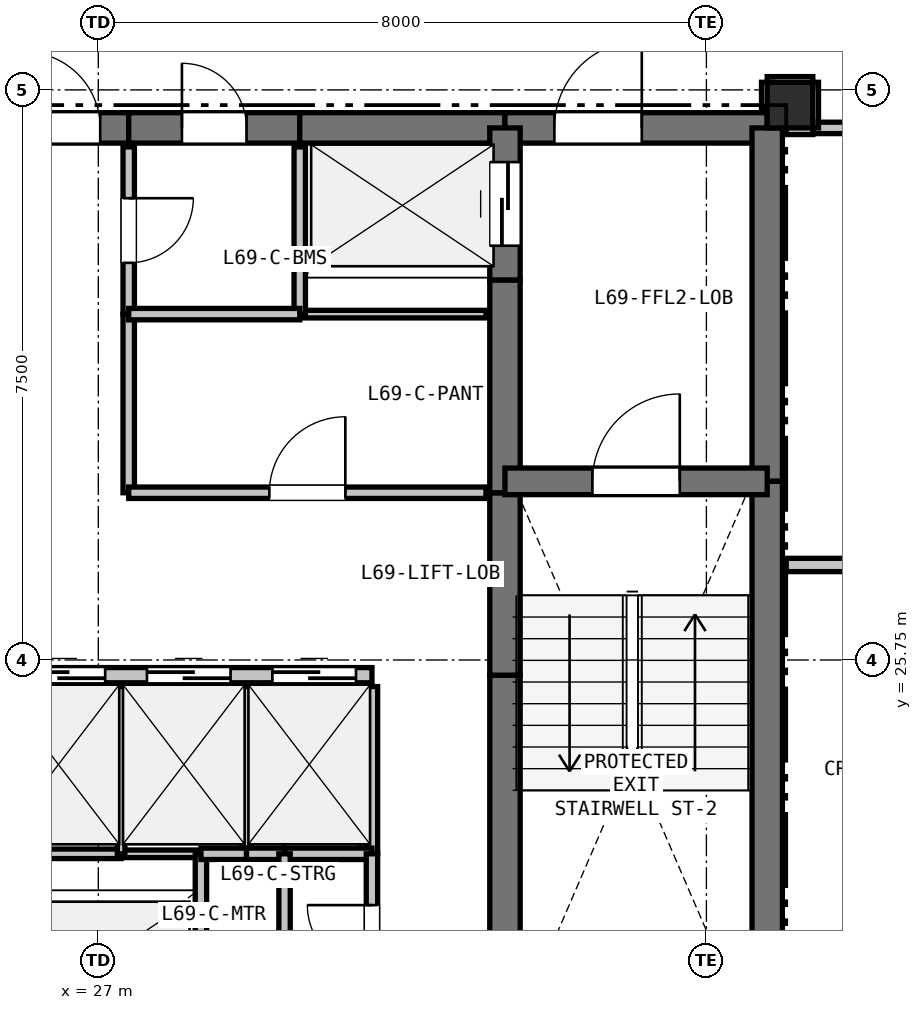
"""IFC4 building model, lengths in metres.
Left out: names, types, materials, properties, quantities, classifications, styles, units other than length and angle.
Written with IfcOpenShell. Run it as: python <this file> out.ifc"""

import sys

from ifc_helpers import new_model, si_unit, direction, frame, frame_2d, origin, origin_2d, place, context, subcontext, project, spatial, rectangle, extrude, element, fill, save


model = new_model("IFC4")
c1 = context("Model", 3, precision=1e-05, world=origin(), true_north=direction((0.0, 1.0)))
c2 = subcontext(c1, "Body", "Model", "MODEL_VIEW")
j1 = project(units=[si_unit("LENGTHUNIT", "METRE"), si_unit("PLANEANGLEUNIT", "RADIAN")], contexts=[c1])
p1 = place(None, origin())
s1 = spatial("IfcSite", under=j1, at=p1, CompositionType="ELEMENT")
p2 = place(p1, origin())
s2 = spatial("IfcBuilding", under=s1, at=p2, CompositionType="ELEMENT")
p3 = place(p2, frame((0.0, 0.0, 246.3)))
s3 = spatial("IfcBuildingStorey", under=s2, at=p3, CompositionType="ELEMENT", Elevation=246.3)
p4 = place(p3, frame((36.1, 33.05, 0.0), z_axis=(0.0, 0.0, 1.0), x_axis=(1.0, 0.0, 0.0)))
e1 = element("IfcColumn", 1, at=p4, inside=s3, PredefinedType="COLUMN", context=c2, shape_type="SweptSolid", body=[
    extrude(rectangle(XDim=0.6, YDim=0.6, at=origin_2d()), origin(), (0.0, 0.0, 1.0), 3.3),
])
p5 = place(p3, frame((25.65, 32.75, 0.0), z_axis=(0.0, 0.0, 1.0), x_axis=(1.0, 0.0, 0.0)))
e2 = element("IfcWall", 2, at=p5, inside=s3, PredefinedType="SHEAR", context=c2, shape_type="SweptSolid", body=[
    extrude(rectangle(XDim=1.75, YDim=0.4, at=frame_2d((0.875, 0.0))), origin(), (0.0, 0.0, 1.0), 3.02),
])
p6 = place(p5, frame((0.375, 0.0, 0.0)))
e3 = element("IfcOpeningElement", 3, at=p6, cuts=e2, PredefinedType="OPENING", context=c2, shape_type="SweptSolid", body=[
    extrude(rectangle(XDim=1.0, YDim=2.15, at=frame_2d((0.5, 1.075))), frame((0.0, 0.21, 0.0), z_axis=(0.0, -1.0, 0.0), x_axis=(1.0, 0.0, 0.0)), (0.0, 0.0, 1.0), 0.42),
])
p7 = place(p3, frame((27.4, 32.75, 0.0), z_axis=(0.0, 0.0, 1.0), x_axis=(1.0, 0.0, 0.0)))
e4 = element("IfcWall", 4, at=p7, inside=s3, PredefinedType="SHEAR", context=c2, shape_type="SweptSolid", body=[
    extrude(rectangle(XDim=2.25, YDim=0.4, at=frame_2d((1.125, 0.0))), origin(), (0.0, 0.0, 1.0), 3.02),
])
p8 = place(p7, frame((0.7, 0.0, 0.0)))
e5 = element("IfcOpeningElement", 5, at=p8, cuts=e4, PredefinedType="OPENING", context=c2, shape_type="SweptSolid", body=[
    extrude(rectangle(XDim=0.85, YDim=2.1, at=frame_2d((0.425, 1.05))), frame((0.0, 0.21, 0.0), z_axis=(0.0, -1.0, 0.0), x_axis=(1.0, 0.0, 0.0)), (0.0, 0.0, 1.0), 0.42),
])
p9 = place(p3, frame((29.65, 32.75, 0.0), z_axis=(0.0, 0.0, 1.0), x_axis=(1.0, 0.0, 0.0)))
e6 = element("IfcWall", 6, at=p9, inside=s3, PredefinedType="SHEAR", context=c2, shape_type="SweptSolid", body=[
    extrude(rectangle(XDim=2.7, YDim=0.4, at=frame_2d((1.35, 0.0))), origin(), (0.0, 0.0, 1.0), 3.02),
])
p10 = place(p3, frame((32.35, 32.75, 0.0), z_axis=(0.0, 0.0, 1.0), x_axis=(1.0, 0.0, 0.0)))
e7 = element("IfcWall", 7, at=p10, inside=s3, PredefinedType="SHEAR", context=c2, shape_type="SweptSolid", body=[
    extrude(rectangle(XDim=3.45, YDim=0.4, at=frame_2d((1.725, 0.0))), origin(), (0.0, 0.0, 1.0), 3.02),
])
p11 = place(p10, frame((0.65, 0.0, 0.0)))
e8 = element("IfcOpeningElement", 8, at=p11, cuts=e7, PredefinedType="OPENING", context=c2, shape_type="SweptSolid", body=[
    extrude(rectangle(XDim=1.15, YDim=2.15, at=frame_2d((0.575, 1.075))), frame((0.0, 0.21, 0.0), z_axis=(0.0, -1.0, 0.0), x_axis=(1.0, 0.0, 0.0)), (0.0, 0.0, 1.0), 0.42),
])
p12 = place(p3, frame((35.8, 32.75, 0.0), z_axis=(0.0, 0.0, 1.0), x_axis=(0.0, -1.0, 0.0)))
e9 = element("IfcWall", 9, at=p12, inside=s3, PredefinedType="SHEAR", context=c2, shape_type="SweptSolid", body=[
    extrude(rectangle(XDim=4.65, YDim=0.4, at=frame_2d((2.325, 0.0))), origin(), (0.0, 0.0, 1.0), 3.02),
])
p13 = place(p3, frame((35.8, 28.1, 0.0), z_axis=(0.0, 0.0, 1.0), x_axis=(0.0, -1.0, 0.0)))
e10 = element("IfcWall", 10, at=p13, inside=s3, PredefinedType="SHEAR", context=c2, shape_type="SweptSolid", body=[
    extrude(rectangle(XDim=7.35, YDim=0.4, at=frame_2d((3.675, 0.0))), origin(), (0.0, 0.0, 1.0), 3.02),
])
p14 = place(p3, frame((32.35, 20.75, 0.0), z_axis=(0.0, 0.0, 1.0), x_axis=(0.0, 1.0, 0.0)))
e11 = element("IfcWall", 11, at=p14, inside=s3, PredefinedType="SHEAR", context=c2, shape_type="SweptSolid", body=[
    extrude(rectangle(XDim=4.8, YDim=0.4, at=frame_2d((2.4, 0.0))), origin(), (0.0, 0.0, 1.0), 3.02),
])
p15 = place(p3, frame((32.35, 25.55, 0.0), z_axis=(0.0, 0.0, 1.0), x_axis=(0.0, 1.0, 0.0)))
e12 = element("IfcWall", 12, at=p15, inside=s3, PredefinedType="SHEAR", context=c2, shape_type="SweptSolid", body=[
    extrude(rectangle(XDim=2.4, YDim=0.4, at=frame_2d((1.2, 0.0))), origin(), (0.0, 0.0, 1.0), 3.02),
])
p16 = place(p3, frame((32.35, 27.95, 0.0), z_axis=(0.0, 0.0, 1.0), x_axis=(0.0, 1.0, 0.0)))
e13 = element("IfcWall", 13, at=p16, inside=s3, PredefinedType="SHEAR", context=c2, shape_type="SweptSolid", body=[
    extrude(rectangle(XDim=2.8, YDim=0.4, at=frame_2d((1.4, 0.0))), origin(), (0.0, 0.0, 1.0), 3.02),
])
p17 = place(p3, frame((32.35, 30.75, 0.0), z_axis=(0.0, 0.0, 1.0), x_axis=(0.0, 1.0, 0.0)))
e14 = element("IfcWall", 14, at=p17, inside=s3, PredefinedType="SHEAR", context=c2, shape_type="SweptSolid", body=[
    extrude(rectangle(XDim=2.0, YDim=0.4, at=frame_2d((1.0, 0.0))), origin(), (0.0, 0.0, 1.0), 3.02),
])
p18 = place(p17, frame((0.45, 0.0, 0.0)))
e15 = element("IfcOpeningElement", 15, at=p18, cuts=e14, PredefinedType="OPENING", context=c2, shape_type="SweptSolid", body=[
    extrude(rectangle(XDim=1.1, YDim=2.15, at=frame_2d((0.55, 1.075))), frame((0.0, 0.21, 0.0), z_axis=(0.0, -1.0, 0.0), x_axis=(1.0, 0.0, 0.0)), (0.0, 0.0, 1.0), 0.42),
])
p19 = place(p3, frame((32.35, 28.1, 0.0), z_axis=(0.0, 0.0, 1.0), x_axis=(1.0, 0.0, 0.0)))
e16 = element("IfcWall", 16, at=p19, inside=s3, PredefinedType="SHEAR", context=c2, shape_type="SweptSolid", body=[
    extrude(rectangle(XDim=3.45, YDim=0.35, at=frame_2d((1.725, 0.0))), origin(), (0.0, 0.0, 1.0), 3.02),
])
p20 = place(p19, frame((1.15, 0.0, 0.0)))
e17 = element("IfcOpeningElement", 17, at=p20, cuts=e16, PredefinedType="OPENING", context=c2, shape_type="SweptSolid", body=[
    extrude(rectangle(XDim=1.15, YDim=2.15, at=frame_2d((0.575, 1.075))), frame((0.0, 0.185, 0.0), z_axis=(0.0, -1.0, 0.0), x_axis=(1.0, 0.0, 0.0)), (0.0, 0.0, 1.0), 0.37),
])
p21 = place(p3, frame((25.65, 25.55, 0.0), z_axis=(0.0, 0.0, 1.0), x_axis=(1.0, 0.0, 0.0)))
e18 = element("IfcWall", 18, at=p21, inside=s3, PredefinedType="PARTITIONING", context=c2, shape_type="SweptSolid", body=[
    extrude(rectangle(XDim=4.95, YDim=0.2, at=frame_2d((2.475, 0.0))), origin(), (0.0, 0.0, 1.0), 3.02),
])
p22 = place(p21, frame((0.34, 0.0, 0.0)))
e19 = element("IfcOpeningElement", 19, at=p22, cuts=e18, PredefinedType="OPENING", context=c2, shape_type="SweptSolid", body=[
    extrude(rectangle(XDim=1.1, YDim=2.15, at=frame_2d((0.55, 1.075))), frame((0.0, 0.11, 0.0), z_axis=(0.0, -1.0, 0.0), x_axis=(1.0, 0.0, 0.0)), (0.0, 0.0, 1.0), 0.22),
])
p23 = place(p21, frame((1.99, 0.0, 0.0)))
e20 = element("IfcOpeningElement", 20, at=p23, cuts=e18, PredefinedType="OPENING", context=c2, shape_type="SweptSolid", body=[
    extrude(rectangle(XDim=1.1, YDim=2.15, at=frame_2d((0.55, 1.075))), frame((0.0, 0.11, 0.0), z_axis=(0.0, -1.0, 0.0), x_axis=(1.0, 0.0, 0.0)), (0.0, 0.0, 1.0), 0.22),
])
p24 = place(p21, frame((3.64, 0.0, 0.0)))
e21 = element("IfcOpeningElement", 21, at=p24, cuts=e18, PredefinedType="OPENING", context=c2, shape_type="SweptSolid", body=[
    extrude(rectangle(XDim=1.1, YDim=2.15, at=frame_2d((0.55, 1.075))), frame((0.0, 0.11, 0.0), z_axis=(0.0, -1.0, 0.0), x_axis=(1.0, 0.0, 0.0)), (0.0, 0.0, 1.0), 0.22),
])
p25 = place(p3, frame((25.9, 23.2, 0.0), z_axis=(0.0, 0.0, 1.0), x_axis=(1.0, 0.0, 0.0)))
e22 = element("IfcWall", 22, at=p25, inside=s3, PredefinedType="PARTITIONING", context=c2, shape_type="SweptSolid", body=[
    extrude(rectangle(XDim=1.4, YDim=0.125, at=frame_2d((0.7, 0.0))), origin(), (0.0, 0.0, 1.0), 3.02),
])
p26 = place(p3, frame((27.3, 23.2, 0.0), z_axis=(0.0, 0.0, 1.0), x_axis=(1.0, 0.0, 0.0)))
e23 = element("IfcWall", 23, at=p26, inside=s3, PredefinedType="PARTITIONING", context=c2, shape_type="SweptSolid", body=[
    extrude(rectangle(XDim=1.05, YDim=0.1, at=frame_2d((0.525, 0.0))), origin(), (0.0, 0.0, 1.0), 3.02),
])
p27 = place(p3, frame((28.35, 23.2, 0.0), z_axis=(0.0, 0.0, 1.0), x_axis=(0.0, -1.0, 0.0)))
e24 = element("IfcWall", 24, at=p27, inside=s3, PredefinedType="PARTITIONING", context=c2, shape_type="SweptSolid", body=[
    extrude(rectangle(XDim=2.2, YDim=0.15, at=frame_2d((1.1, 0.0))), origin(), (0.0, 0.0, 1.0), 3.02),
])
p28 = place(p3, frame((32.1, 30.3, 0.0), z_axis=(0.0, 0.0, 1.0), x_axis=(-1.0, 0.0, 0.0)))
e25 = element("IfcWall", 25, at=p28, inside=s3, PredefinedType="PARTITIONING", context=c2, shape_type="SweptSolid", body=[
    extrude(rectangle(XDim=2.45, YDim=0.1, at=frame_2d((1.225, 0.0))), origin(), (0.0, 0.0, 1.0), 3.02),
])
p29 = place(p3, frame((29.65, 30.3, 0.0), z_axis=(0.0, 0.0, 1.0), x_axis=(0.0, 1.0, 0.0)))
e26 = element("IfcWall", 26, at=p29, inside=s3, PredefinedType="PARTITIONING", context=c2, shape_type="SweptSolid", body=[
    extrude(rectangle(XDim=2.2, YDim=0.15, at=frame_2d((1.1, 0.0))), origin(), (0.0, 0.0, 1.0), 3.02),
])
p30 = place(p3, frame((27.3, 25.4, 0.0), z_axis=(0.0, 0.0, 1.0), x_axis=(0.0, -1.0, 0.0)))
e27 = element("IfcWall", 27, at=p30, inside=s3, PredefinedType="PARTITIONING", context=c2, shape_type="SweptSolid", body=[
    extrude(rectangle(XDim=2.2, YDim=0.1, at=frame_2d((1.1, 0.0))), origin(), (0.0, 0.0, 1.0), 3.02),
])
p31 = place(p3, frame((28.95, 25.4, 0.0), z_axis=(0.0, 0.0, 1.0), x_axis=(0.0, -1.0, 0.0)))
e28 = element("IfcWall", 28, at=p31, inside=s3, PredefinedType="PARTITIONING", context=c2, shape_type="SweptSolid", body=[
    extrude(rectangle(XDim=2.2, YDim=0.125, at=frame_2d((1.1, 0.0))), origin(), (0.0, 0.0, 1.0), 3.02),
])
p32 = place(p3, frame((28.95, 23.2, 0.0), z_axis=(0.0, 0.0, 1.0), x_axis=(-1.0, 0.0, 0.0)))
e29 = element("IfcWall", 29, at=p32, inside=s3, PredefinedType="PARTITIONING", context=c2, shape_type="SweptSolid", body=[
    extrude(rectangle(XDim=0.6, YDim=0.15, at=frame_2d((0.3, 0.0))), origin(), (0.0, 0.0, 1.0), 3.02),
])
p33 = place(p3, frame((30.6, 25.4, 0.0), z_axis=(0.0, 0.0, 1.0), x_axis=(0.0, -1.0, 0.0)))
e30 = element("IfcWall", 30, at=p33, inside=s3, PredefinedType="PARTITIONING", context=c2, shape_type="SweptSolid", body=[
    extrude(rectangle(XDim=2.2, YDim=0.15, at=frame_2d((1.1, 0.0))), origin(), (0.0, 0.0, 1.0), 3.02),
])
p34 = place(p3, frame((30.6, 23.2, 0.0), z_axis=(0.0, 0.0, 1.0), x_axis=(-1.0, 0.0, 0.0)))
e31 = element("IfcWall", 31, at=p34, inside=s3, PredefinedType="PARTITIONING", context=c2, shape_type="SweptSolid", body=[
    extrude(rectangle(XDim=1.15, YDim=0.15, at=frame_2d((0.575, 0.0))), origin(), (0.0, 0.0, 1.0), 3.02),
])
p35 = place(p3, frame((29.45, 23.2, 0.0), z_axis=(0.0, 0.0, 1.0), x_axis=(-1.0, 0.0, 0.0)))
e32 = element("IfcWall", 32, at=p35, inside=s3, PredefinedType="PARTITIONING", context=c2, shape_type="SweptSolid", body=[
    extrude(rectangle(XDim=0.5, YDim=0.15, at=frame_2d((0.25, 0.0))), origin(), (0.0, 0.0, 1.0), 3.02),
])
p36 = place(p3, frame((30.6, 21.0, 0.0), z_axis=(0.0, 0.0, 1.0), x_axis=(0.0, 1.0, 0.0)))
e33 = element("IfcWall", 33, at=p36, inside=s3, PredefinedType="PARTITIONING", context=c2, shape_type="SweptSolid", body=[
    extrude(rectangle(XDim=2.2, YDim=0.15, at=frame_2d((1.1, 0.0))), origin(), (0.0, 0.0, 1.0), 3.02),
])
p37 = place(p36, frame((0.675, 0.0, 0.0)))
e34 = element("IfcOpeningElement", 34, at=p37, cuts=e33, PredefinedType="OPENING", context=c2, shape_type="SweptSolid", body=[
    extrude(rectangle(XDim=0.85, YDim=2.1, at=frame_2d((0.425, 1.05))), frame((0.0, 0.085, 0.0), z_axis=(0.0, -1.0, 0.0), x_axis=(1.0, 0.0, 0.0)), (0.0, 0.0, 1.0), 0.17),
])
p38 = place(p3, frame((27.4, 32.5, 0.0), z_axis=(0.0, 0.0, 1.0), x_axis=(0.0, -1.0, 0.0)))
e35 = element("IfcWall", 35, at=p38, inside=s3, PredefinedType="PARTITIONING", context=c2, shape_type="SweptSolid", body=[
    extrude(rectangle(XDim=2.2, YDim=0.15, at=frame_2d((1.1, 0.0))), origin(), (0.0, 0.0, 1.0), 3.02),
])
p39 = place(p38, frame((0.675, 0.0, 0.0)))
e36 = element("IfcOpeningElement", 36, at=p39, cuts=e35, PredefinedType="OPENING", context=c2, shape_type="SweptSolid", body=[
    extrude(rectangle(XDim=0.85, YDim=2.1, at=frame_2d((0.425, 1.05))), frame((0.0, 0.085, 0.0), z_axis=(0.0, -1.0, 0.0), x_axis=(1.0, 0.0, 0.0)), (0.0, 0.0, 1.0), 0.17),
])
p40 = place(p3, frame((27.4, 30.3, 0.0), z_axis=(0.0, 0.0, 1.0), x_axis=(0.0, -1.0, 0.0)))
e37 = element("IfcWall", 37, at=p40, inside=s3, PredefinedType="PARTITIONING", context=c2, shape_type="SweptSolid", body=[
    extrude(rectangle(XDim=2.35, YDim=0.15, at=frame_2d((1.175, 0.0))), origin(), (0.0, 0.0, 1.0), 3.02),
])
p41 = place(p3, frame((27.4, 27.95, 0.0), z_axis=(0.0, 0.0, 1.0), x_axis=(1.0, 0.0, 0.0)))
e38 = element("IfcWall", 38, at=p41, inside=s3, PredefinedType="PARTITIONING", context=c2, shape_type="SweptSolid", body=[
    extrude(rectangle(XDim=4.7, YDim=0.15, at=frame_2d((2.35, 0.0))), origin(), (0.0, 0.0, 1.0), 3.02),
])
p42 = place(p41, frame((1.85, 0.0, 0.0)))
e39 = element("IfcOpeningElement", 39, at=p42, cuts=e38, PredefinedType="OPENING", context=c2, shape_type="SweptSolid", body=[
    extrude(rectangle(XDim=1.0, YDim=2.15, at=frame_2d((0.5, 1.075))), frame((0.0, 0.085, 0.0), z_axis=(0.0, -1.0, 0.0), x_axis=(1.0, 0.0, 0.0)), (0.0, 0.0, 1.0), 0.17),
])
p43 = place(p3, frame((38.2, 32.75, 0.0), z_axis=(0.0, 0.0, 1.0), x_axis=(-1.0, 0.0, 0.0)))
e40 = element("IfcWall", 40, at=p43, inside=s3, PredefinedType="PARTITIONING", context=c2, shape_type="SweptSolid", body=[
    extrude(rectangle(XDim=1.8, YDim=0.15, at=frame_2d((0.9, 0.0))), origin(), (0.0, 0.0, 1.0), 3.02),
])
p44 = place(p43, frame((0.475, 0.0, 0.0)))
e41 = element("IfcOpeningElement", 41, at=p44, cuts=e40, PredefinedType="OPENING", context=c2, shape_type="SweptSolid", body=[
    extrude(rectangle(XDim=0.85, YDim=2.1, at=frame_2d((0.425, 1.05))), frame((0.0, 0.085, 0.0), z_axis=(0.0, -1.0, 0.0), x_axis=(1.0, 0.0, 0.0)), (0.0, 0.0, 1.0), 0.17),
])
p45 = place(p3, frame((36.4, 32.75, 0.0), z_axis=(0.0, 0.0, 1.0), x_axis=(0.0, 1.0, 0.0)))
e42 = element("IfcWall", 42, at=p45, inside=s3, PredefinedType="PARTITIONING", context=c2, shape_type="SweptSolid", body=[
    extrude(rectangle(XDim=0.6, YDim=0.15, at=frame_2d((0.3, 0.0))), origin(), (0.0, 0.0, 1.0), 2.468),
])
p46 = place(p3, frame((36.4, 33.35, 0.0), z_axis=(0.0, 0.0, 1.0), x_axis=(-1.0, 0.0, 0.0)))
e43 = element("IfcWall", 43, at=p46, inside=s3, PredefinedType="PARTITIONING", context=c2, shape_type="SweptSolid", body=[
    extrude(rectangle(XDim=0.6, YDim=0.15, at=frame_2d((0.3, 0.0))), origin(), (0.0, 0.0, 1.0), 2.468),
])
p47 = place(p3, frame((35.8, 33.35, 0.0), z_axis=(0.0, 0.0, 1.0), x_axis=(0.0, -1.0, 0.0)))
e44 = element("IfcWall", 44, at=p47, inside=s3, PredefinedType="PARTITIONING", context=c2, shape_type="SweptSolid", body=[
    extrude(rectangle(XDim=0.35, YDim=0.15, at=frame_2d((0.175, 0.0))), origin(), (0.0, 0.0, 1.0), 2.545),
])
p48 = place(p3, frame((36.05, 32.75, 0.0), z_axis=(0.0, 0.0, 1.0), x_axis=(1.0, 0.0, 0.0)))
e45 = element("IfcWall", 45, at=p48, inside=s3, PredefinedType="PLUMBINGWALL", context=c2, shape_type="SweptSolid", body=[
    extrude(rectangle(XDim=0.35, YDim=0.175, at=frame_2d((0.175, 0.0))), origin(), (0.0, 0.0, 1.0), 2.545),
])
p49 = place(p3, frame((39.703, 27.0, 0.0), z_axis=(0.0, 0.0, 1.0), x_axis=(-1.0, 0.0, 0.0)))
e46 = element("IfcWall", 46, at=p49, inside=s3, PredefinedType="PLUMBINGWALL", context=c2, shape_type="SweptSolid", body=[
    extrude(rectangle(XDim=3.653, YDim=0.175, at=frame_2d((1.826, 0.0))), origin(), (0.0, 0.0, 1.0), 2.365),
])
p50 = place(p3, frame((27.4, 30.3, 0.0), z_axis=(0.0, 0.0, 1.0), x_axis=(1.0, 0.0, 0.0)))
e47 = element("IfcWall", 47, at=p50, inside=s3, PredefinedType="PARTITIONING", context=c2, shape_type="SweptSolid", body=[
    extrude(rectangle(XDim=2.25, YDim=0.15, at=frame_2d((1.125, 0.0))), origin(), (0.0, 0.0, 1.0), 3.02),
])
p51 = place(p3, frame((29.45, 23.2, 0.0), z_axis=(0.0, 0.0, 1.0), x_axis=(0.0, -1.0, 0.0)))
e48 = element("IfcWall", 48, at=p51, inside=s3, PredefinedType="PARTITIONING", context=c2, shape_type="SweptSolid", body=[
    extrude(rectangle(XDim=2.2, YDim=0.15, at=frame_2d((1.1, 0.0))), origin(), (0.0, 0.0, 1.0), 3.02),
])
p52 = place(p22, origin())
e49 = element("IfcDoor", 49, at=p52, inside=s3, OperationType="SLIDING_TO_LEFT", PredefinedType="DOOR", context=c2, shape_type="SweptSolid", body=[
    extrude(rectangle(XDim=1.1, YDim=2.15, at=frame_2d((0.55, 1.075))), frame((0.0, 0.025, 0.0), z_axis=(0.0, -1.0, 0.0), x_axis=(1.0, 0.0, 0.0)), (0.0, 0.0, 1.0), 0.05),
])
fill(e19, e49)
p53 = place(p23, origin())
e50 = element("IfcDoor", 50, at=p53, inside=s3, OperationType="SLIDING_TO_LEFT", PredefinedType="DOOR", context=c2, shape_type="SweptSolid", body=[
    extrude(rectangle(XDim=1.1, YDim=2.15, at=frame_2d((0.55, 1.075))), frame((0.0, 0.025, 0.0), z_axis=(0.0, -1.0, 0.0), x_axis=(1.0, 0.0, 0.0)), (0.0, 0.0, 1.0), 0.05),
])
fill(e20, e50)
p54 = place(p24, origin())
e51 = element("IfcDoor", 51, at=p54, inside=s3, OperationType="SLIDING_TO_LEFT", PredefinedType="DOOR", context=c2, shape_type="SweptSolid", body=[
    extrude(rectangle(XDim=1.1, YDim=2.15, at=frame_2d((0.55, 1.075))), frame((0.0, 0.025, 0.0), z_axis=(0.0, -1.0, 0.0), x_axis=(1.0, 0.0, 0.0)), (0.0, 0.0, 1.0), 0.05),
])
fill(e21, e51)
p55 = place(p6, origin())
e52 = element("IfcDoor", 52, at=p55, inside=s3, OperationType="SINGLE_SWING_LEFT", PredefinedType="DOOR", context=c2, shape_type="SweptSolid", body=[
    extrude(rectangle(XDim=1.0, YDim=2.15, at=frame_2d((0.5, 1.075))), frame((0.0, 0.025, 0.0), z_axis=(0.0, -1.0, 0.0), x_axis=(1.0, 0.0, 0.0)), (0.0, 0.0, 1.0), 0.05),
])
fill(e3, e52)
p56 = place(p18, origin())
e53 = element("IfcDoor", 53, at=p56, inside=s3, OperationType="SLIDING_TO_LEFT", PredefinedType="DOOR", context=c2, shape_type="SweptSolid", body=[
    extrude(rectangle(XDim=1.1, YDim=2.15, at=frame_2d((0.55, 1.075))), frame((0.0, 0.025, 0.0), z_axis=(0.0, -1.0, 0.0), x_axis=(1.0, 0.0, 0.0)), (0.0, 0.0, 1.0), 0.05),
])
fill(e15, e53)
p57 = place(p20, origin())
e54 = element("IfcDoor", 54, at=p57, inside=s3, OperationType="SINGLE_SWING_RIGHT", PredefinedType="DOOR", context=c2, shape_type="SweptSolid", body=[
    extrude(rectangle(XDim=1.15, YDim=2.15, at=frame_2d((0.575, 1.075))), frame((0.0, 0.025, 0.0), z_axis=(0.0, -1.0, 0.0), x_axis=(1.0, 0.0, 0.0)), (0.0, 0.0, 1.0), 0.05),
])
fill(e17, e54)
p58 = place(p11, origin())
e55 = element("IfcDoor", 55, at=p58, inside=s3, OperationType="SINGLE_SWING_RIGHT", PredefinedType="DOOR", context=c2, shape_type="SweptSolid", body=[
    extrude(rectangle(XDim=1.15, YDim=2.15, at=frame_2d((0.575, 1.075))), frame((0.0, 0.025, 0.0), z_axis=(0.0, -1.0, 0.0), x_axis=(1.0, 0.0, 0.0)), (0.0, 0.0, 1.0), 0.05),
])
fill(e8, e55)
p59 = place(p42, origin())
e56 = element("IfcDoor", 56, at=p59, inside=s3, OperationType="SINGLE_SWING_RIGHT", PredefinedType="DOOR", context=c2, shape_type="SweptSolid", body=[
    extrude(rectangle(XDim=1.0, YDim=2.15, at=frame_2d((0.5, 1.075))), frame((0.0, 0.025, 0.0), z_axis=(0.0, -1.0, 0.0), x_axis=(1.0, 0.0, 0.0)), (0.0, 0.0, 1.0), 0.05),
])
fill(e39, e56)
p60 = place(p39, origin())
e57 = element("IfcDoor", 57, at=p60, inside=s3, OperationType="SINGLE_SWING_LEFT", PredefinedType="DOOR", context=c2, shape_type="SweptSolid", body=[
    extrude(rectangle(XDim=0.85, YDim=2.1, at=frame_2d((0.425, 1.05))), frame((0.0, 0.025, 0.0), z_axis=(0.0, -1.0, 0.0), x_axis=(1.0, 0.0, 0.0)), (0.0, 0.0, 1.0), 0.05),
])
fill(e36, e57)
p61 = place(p37, origin())
e58 = element("IfcDoor", 58, at=p61, inside=s3, OperationType="SINGLE_SWING_RIGHT", PredefinedType="DOOR", context=c2, shape_type="SweptSolid", body=[
    extrude(rectangle(XDim=0.85, YDim=2.1, at=frame_2d((0.425, 1.05))), frame((0.0, 0.025, 0.0), z_axis=(0.0, -1.0, 0.0), x_axis=(1.0, 0.0, 0.0)), (0.0, 0.0, 1.0), 0.05),
])
fill(e34, e58)
p62 = place(p8, origin())
e59 = element("IfcDoor", 59, at=p62, inside=s3, OperationType="SINGLE_SWING_LEFT", PredefinedType="DOOR", context=c2, shape_type="SweptSolid", body=[
    extrude(rectangle(XDim=0.85, YDim=2.1, at=frame_2d((0.425, 1.05))), frame((0.0, 0.025, 0.0), z_axis=(0.0, -1.0, 0.0), x_axis=(1.0, 0.0, 0.0)), (0.0, 0.0, 1.0), 0.05),
])
fill(e5, e59)
save(model, sys.argv[1])
